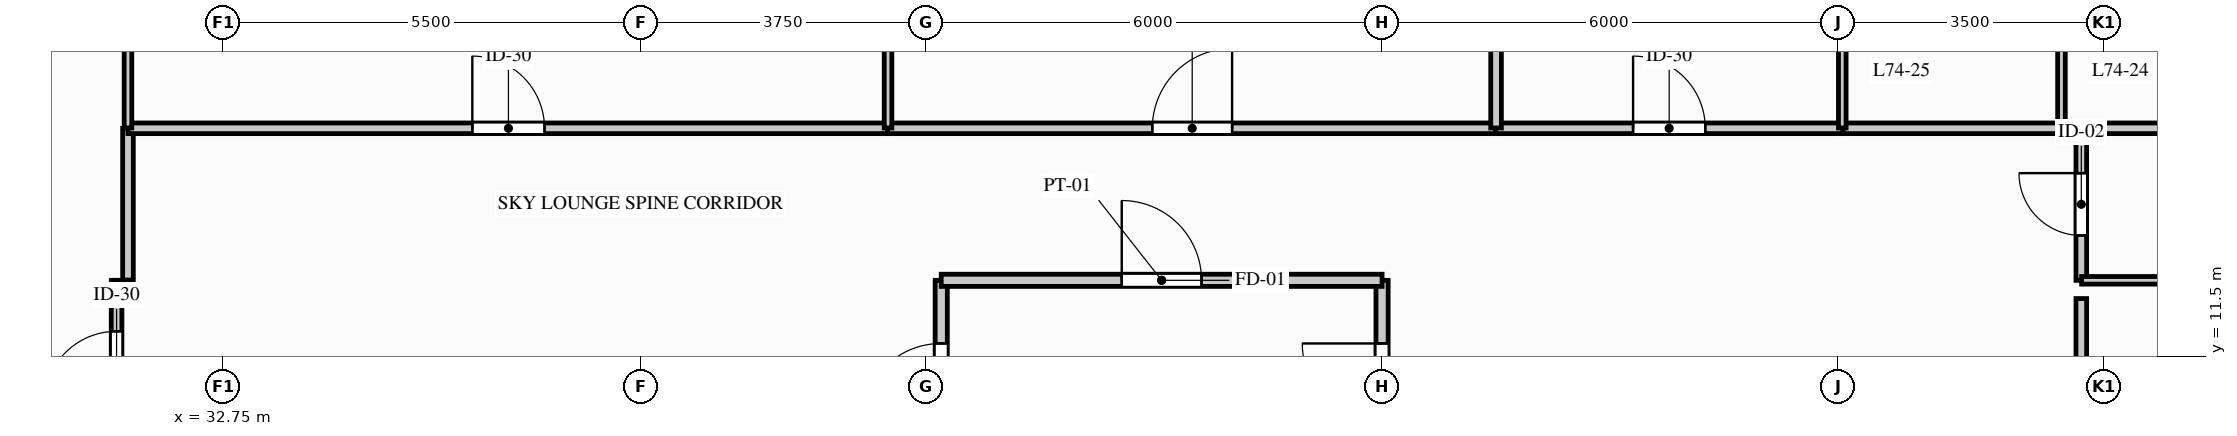
"""IFC4 building model, lengths in metres.
Left out: names, types, materials, properties, quantities, classifications, styles, units other than length and angle.
Written with IfcOpenShell. Run it as: python <this file> out.ifc"""

import sys

from ifc_helpers import new_model, si_unit, direction, frame, frame_2d, origin, place, context, subcontext, project, spatial, rectangle, extrude, element, fill, save


model = new_model("IFC4")
c1 = context("Model", 3, precision=1e-05, world=origin(), true_north=direction((0.0, 1.0)))
c2 = subcontext(c1, "Body", "Model", "MODEL_VIEW")
j1 = project(units=[si_unit("LENGTHUNIT", "METRE"), si_unit("PLANEANGLEUNIT", "RADIAN")], contexts=[c1])
p1 = place(None, origin())
s1 = spatial("IfcSite", under=j1, at=p1, CompositionType="ELEMENT")
p2 = place(p1, origin())
s2 = spatial("IfcBuilding", under=s1, at=p2, CompositionType="ELEMENT")
p3 = place(p2, frame((0.0, 0.0, 243.65)))
s3 = spatial("IfcBuildingStorey", under=s2, at=p3, CompositionType="ELEMENT", Elevation=243.65)
p4 = place(p3, frame((31.35, 10.209, 0.0), z_axis=(0.0, 0.0, 1.0), x_axis=(0.0, 1.0, 0.0)))
e1 = element("IfcWall", 1, at=p4, inside=s3, PredefinedType="PARTITIONING", context=c2, shape_type="SweptSolid", body=[
    extrude(rectangle(XDim=2.291, YDim=0.14, at=frame_2d((1.146, 0.0))), origin(), (0.0, 0.0, 1.0), 3.34),
])
p5 = place(p4, frame((0.671, 0.0, 0.0)))
e2 = element("IfcOpeningElement", 2, at=p5, cuts=e1, PredefinedType="OPENING", context=c2, shape_type="SweptSolid", body=[
    extrude(rectangle(XDim=0.95, YDim=2.05, at=frame_2d((0.475, 1.025))), frame((0.0, 0.08, 0.0), z_axis=(0.0, -1.0, 0.0), x_axis=(1.0, 0.0, 0.0)), (0.0, 0.0, 1.0), 0.16),
])
p6 = place(p3, frame((42.2, 9.789, 0.0), z_axis=(0.0, 0.0, 1.0), x_axis=(0.0, 1.0, 0.0)))
e3 = element("IfcWall", 3, at=p6, inside=s3, PredefinedType="PARTITIONING", context=c2, shape_type="SweptSolid", body=[
    extrude(rectangle(XDim=2.711, YDim=0.16, at=frame_2d((1.355, 0.0))), origin(), (0.0, 0.0, 1.0), 2.279),
])
p7 = place(p6, frame((0.831, 0.0, 0.0)))
e4 = element("IfcOpeningElement", 4, at=p7, cuts=e3, PredefinedType="OPENING", context=c2, shape_type="SweptSolid", body=[
    extrude(rectangle(XDim=1.05, YDim=2.06, at=frame_2d((0.525, 1.03))), frame((0.0, 0.09, 0.0), z_axis=(0.0, -1.0, 0.0), x_axis=(1.0, 0.0, 0.0)), (0.0, 0.0, 1.0), 0.18),
])
p8 = place(p3, frame((48.0, 9.789, 0.0), z_axis=(0.0, 0.0, 1.0), x_axis=(0.0, 1.0, 0.0)))
e5 = element("IfcWall", 5, at=p8, inside=s3, PredefinedType="PARTITIONING", context=c2, shape_type="SweptSolid", body=[
    extrude(rectangle(XDim=2.711, YDim=0.16, at=frame_2d((1.355, 0.0))), origin(), (0.0, 0.0, 1.0), 2.703),
])
p9 = place(p8, frame((0.831, 0.0, 0.0)))
e6 = element("IfcOpeningElement", 6, at=p9, cuts=e5, PredefinedType="OPENING", context=c2, shape_type="SweptSolid", body=[
    extrude(rectangle(XDim=1.05, YDim=2.06, at=frame_2d((0.525, 1.03))), frame((0.0, 0.09, 0.0), z_axis=(0.0, -1.0, 0.0), x_axis=(1.0, 0.0, 0.0)), (0.0, 0.0, 1.0), 0.18),
])
p10 = place(p3, frame((42.2, 12.5, 0.0), z_axis=(0.0, 0.0, 1.0), x_axis=(1.0, 0.0, 0.0)))
e7 = element("IfcWall", 7, at=p10, inside=s3, PredefinedType="PARTITIONING", context=c2, shape_type="SweptSolid", body=[
    extrude(rectangle(XDim=5.8, YDim=0.16, at=frame_2d((2.9, 0.0))), origin(), (0.0, 0.0, 1.0), 2.703),
])
p11 = place(p10, frame((2.375, 0.0, 0.0)))
e8 = element("IfcOpeningElement", 8, at=p11, cuts=e7, PredefinedType="OPENING", context=c2, shape_type="SweptSolid", body=[
    extrude(rectangle(XDim=1.05, YDim=2.06, at=frame_2d((0.525, 1.03))), frame((0.0, 0.09, 0.0), z_axis=(0.0, -1.0, 0.0), x_axis=(1.0, 0.0, 0.0)), (0.0, 0.0, 1.0), 0.18),
])
p12 = place(p3, frame((57.2, 12.5, 0.0), z_axis=(0.0, 0.0, 1.0), x_axis=(0.0, 1.0, 0.0)))
e9 = element("IfcWall", 9, at=p12, inside=s3, PredefinedType="PARTITIONING", context=c2, shape_type="SweptSolid", body=[
    extrude(rectangle(XDim=2.0, YDim=0.14, at=frame_2d((1.0, 0.0))), origin(), (0.0, 0.0, 1.0), 3.34),
])
p13 = place(p12, frame((0.59, 0.0, 0.0)))
e10 = element("IfcOpeningElement", 10, at=p13, cuts=e9, PredefinedType="OPENING", context=c2, shape_type="SweptSolid", body=[
    extrude(rectangle(XDim=0.82, YDim=2.02, at=frame_2d((0.41, 1.01))), frame((0.0, 0.08, 0.0), z_axis=(0.0, -1.0, 0.0), x_axis=(1.0, 0.0, 0.0)), (0.0, 0.0, 1.0), 0.16),
])
p14 = place(p3, frame((31.5, 12.504, 0.0), z_axis=(0.0, 0.0, 1.0), x_axis=(0.0, 1.0, 0.0)))
e11 = element("IfcWall", 11, at=p14, inside=s3, PredefinedType="PARTITIONING", context=c2, shape_type="SweptSolid", body=[
    extrude(rectangle(XDim=1.996, YDim=0.14, at=frame_2d((0.998, 0.0))), origin(), (0.0, 0.0, 1.0), 3.34),
])
p15 = place(p3, frame((31.5, 14.5, 0.0), z_axis=(0.0, 0.0, 1.0), x_axis=(1.0, 0.0, 0.0)))
e12 = element("IfcWall", 12, at=p15, inside=s3, PredefinedType="PARTITIONING", context=c2, shape_type="SweptSolid", body=[
    extrude(rectangle(XDim=10.011, YDim=0.14, at=frame_2d((5.006, 0.0))), origin(), (0.0, 0.0, 1.0), 2.703),
])
p16 = place(p15, frame((4.531, 0.0, 0.0)))
e13 = element("IfcOpeningElement", 13, at=p16, cuts=e12, PredefinedType="OPENING", context=c2, shape_type="SweptSolid", body=[
    extrude(rectangle(XDim=0.95, YDim=2.05, at=frame_2d((0.475, 1.025))), frame((0.0, 0.08, 0.0), z_axis=(0.0, -1.0, 0.0), x_axis=(1.0, 0.0, 0.0)), (0.0, 0.0, 1.0), 0.16),
])
p17 = place(p3, frame((41.493, 14.5, 0.0), z_axis=(0.0, 0.0, 1.0), x_axis=(1.0, 0.0, 0.0)))
e14 = element("IfcWall", 14, at=p17, inside=s3, PredefinedType="PARTITIONING", context=c2, shape_type="SweptSolid", body=[
    extrude(rectangle(XDim=8.019, YDim=0.14, at=frame_2d((4.009, 0.0))), origin(), (0.0, 0.0, 1.0), 2.703),
])
p18 = place(p17, frame((3.484, 0.0, 0.0)))
e15 = element("IfcOpeningElement", 15, at=p18, cuts=e14, PredefinedType="OPENING", context=c2, shape_type="SweptSolid", body=[
    extrude(rectangle(XDim=1.05, YDim=2.06, at=frame_2d((0.525, 1.03))), frame((0.0, 0.08, 0.0), z_axis=(0.0, -1.0, 0.0), x_axis=(1.0, 0.0, 0.0)), (0.0, 0.0, 1.0), 0.16),
])
p19 = place(p3, frame((54.044, 14.5, 0.0), z_axis=(0.0, 0.0, 1.0), x_axis=(1.0, 0.0, 0.0)))
e16 = element("IfcWall", 16, at=p19, inside=s3, PredefinedType="PARTITIONING", context=c2, shape_type="SweptSolid", body=[
    extrude(rectangle(XDim=2.903, YDim=0.14, at=frame_2d((1.451, 0.0))), origin(), (0.0, 0.0, 1.0), 2.703),
])
p20 = place(p3, frame((49.493, 14.5, 0.0), z_axis=(0.0, 0.0, 1.0), x_axis=(1.0, 0.0, 0.0)))
e17 = element("IfcWall", 17, at=p20, inside=s3, PredefinedType="PARTITIONING", context=c2, shape_type="SweptSolid", body=[
    extrude(rectangle(XDim=4.57, YDim=0.14, at=frame_2d((2.285, 0.0))), origin(), (0.0, 0.0, 1.0), 2.703),
])
p21 = place(p20, frame((1.81, 0.0, 0.0)))
e18 = element("IfcOpeningElement", 18, at=p21, cuts=e17, PredefinedType="OPENING", context=c2, shape_type="SweptSolid", body=[
    extrude(rectangle(XDim=0.95, YDim=2.05, at=frame_2d((0.475, 1.025))), frame((0.0, 0.08, 0.0), z_axis=(0.0, -1.0, 0.0), x_axis=(1.0, 0.0, 0.0)), (0.0, 0.0, 1.0), 0.16),
])
p22 = place(p3, frame((57.204, 12.5, 0.0), z_axis=(0.0, 0.0, 1.0), x_axis=(1.0, 0.0, 0.0)))
e19 = element("IfcWall", 19, at=p22, inside=s3, PredefinedType="PARTITIONING", context=c2, shape_type="SweptSolid", body=[
    extrude(rectangle(XDim=2.596, YDim=0.1, at=frame_2d((1.298, 0.0))), origin(), (0.0, 0.0, 1.0), 3.34),
])
p23 = place(p3, frame((57.204, 14.5, 0.0), z_axis=(0.0, 0.0, 1.0), x_axis=(1.0, 0.0, 0.0)))
e20 = element("IfcWall", 20, at=p23, inside=s3, PredefinedType="PARTITIONING", context=c2, shape_type="SweptSolid", body=[
    extrude(rectangle(XDim=2.596, YDim=0.14, at=frame_2d((1.298, 0.0))), origin(), (0.0, 0.0, 1.0), 3.34),
])
p24 = place(p3, frame((31.5, 14.504, 0.0), z_axis=(0.0, 0.0, 1.0), x_axis=(0.0, 1.0, 0.0)))
e21 = element("IfcWall", 21, at=p24, inside=s3, PredefinedType="PARTITIONING", context=c2, shape_type="SweptSolid", body=[
    extrude(rectangle(XDim=8.776, YDim=0.1, at=frame_2d((4.388, 0.0))), origin(), (0.0, 0.0, 1.0), 2.279),
])
p25 = place(p3, frame((41.5, 14.504, 0.0), z_axis=(0.0, 0.0, 1.0), x_axis=(0.0, 1.0, 0.0)))
e22 = element("IfcWall", 22, at=p25, inside=s3, PredefinedType="PARTITIONING", context=c2, shape_type="SweptSolid", body=[
    extrude(rectangle(XDim=11.796, YDim=0.1, at=frame_2d((5.898, 0.0))), origin(), (0.0, 0.0, 1.0), 2.279),
])
p26 = place(p3, frame((49.5, 14.504, 0.0), z_axis=(0.0, 0.0, 1.0), x_axis=(0.0, 1.0, 0.0)))
e23 = element("IfcWall", 23, at=p26, inside=s3, PredefinedType="PARTITIONING", context=c2, shape_type="SweptSolid", body=[
    extrude(rectangle(XDim=7.203, YDim=0.14, at=frame_2d((3.602, 0.0))), origin(), (0.0, 0.0, 1.0), 2.703),
])
for number, where, z_axis, x_axis in (
    (24, (56.939, 14.504, 0.0), (0.0, 0.0, 1.0), (0.0, 1.0, 0.0)),
    (25, (54.055, 14.504, 0.0), (0.0, 0.0, 1.0), (0.0, 1.0, 0.0)),
):
    element("IfcWall", number, at=place(p3, frame(where, z_axis=z_axis, x_axis=x_axis)), inside=s3, PredefinedType="PARTITIONING", context=c2, shape_type="SweptSolid", body=[
        extrude(rectangle(XDim=2.346, YDim=0.1, at=frame_2d((1.173, 0.0))), origin(), (0.0, 0.0, 1.0), 2.703),
    ])
p27 = place(p3, frame((57.2, 10.04, 0.0), z_axis=(0.0, 0.0, 1.0), x_axis=(0.0, 1.0, 0.0)))
e26 = element("IfcWall", 26, at=p27, inside=s3, PredefinedType="PARTITIONING", context=c2, shape_type="SweptSolid", body=[
    extrude(rectangle(XDim=2.22, YDim=0.14, at=frame_2d((1.11, 0.0))), origin(), (0.0, 0.0, 1.0), 2.703),
])
p28 = place(p5, origin())
e27 = element("IfcDoor", 27, at=p28, inside=s3, OperationType="SINGLE_SWING_LEFT", PredefinedType="DOOR", context=c2, shape_type="SweptSolid", body=[
    extrude(rectangle(XDim=0.95, YDim=2.05, at=frame_2d((0.475, 1.025))), frame((0.0, 0.025, 0.0), z_axis=(0.0, -1.0, 0.0), x_axis=(1.0, 0.0, 0.0)), (0.0, 0.0, 1.0), 0.05),
])
fill(e2, e27)
p29 = place(p7, origin())
e28 = element("IfcDoor", 28, at=p29, inside=s3, OperationType="SINGLE_SWING_LEFT", PredefinedType="DOOR", context=c2, shape_type="SweptSolid", body=[
    extrude(rectangle(XDim=1.05, YDim=2.06, at=frame_2d((0.525, 1.03))), frame((0.0, 0.025, 0.0), z_axis=(0.0, -1.0, 0.0), x_axis=(1.0, 0.0, 0.0)), (0.0, 0.0, 1.0), 0.05),
])
fill(e4, e28)
p30 = place(p9, origin())
e29 = element("IfcDoor", 29, at=p30, inside=s3, OperationType="SINGLE_SWING_RIGHT", PredefinedType="DOOR", context=c2, shape_type="SweptSolid", body=[
    extrude(rectangle(XDim=1.05, YDim=2.06, at=frame_2d((0.525, 1.03))), frame((0.0, 0.025, 0.0), z_axis=(0.0, -1.0, 0.0), x_axis=(1.0, 0.0, 0.0)), (0.0, 0.0, 1.0), 0.05),
])
fill(e6, e29)
p31 = place(p11, origin())
e30 = element("IfcDoor", 30, at=p31, inside=s3, OperationType="SINGLE_SWING_LEFT", PredefinedType="DOOR", context=c2, shape_type="SweptSolid", body=[
    extrude(rectangle(XDim=1.05, YDim=2.06, at=frame_2d((0.525, 1.03))), frame((0.0, 0.025, 0.0), z_axis=(0.0, -1.0, 0.0), x_axis=(1.0, 0.0, 0.0)), (0.0, 0.0, 1.0), 0.05),
])
fill(e8, e30)
p32 = place(p13, origin())
e31 = element("IfcDoor", 31, at=p32, inside=s3, OperationType="SINGLE_SWING_RIGHT", PredefinedType="DOOR", context=c2, shape_type="SweptSolid", body=[
    extrude(rectangle(XDim=0.82, YDim=2.02, at=frame_2d((0.41, 1.01))), frame((0.0, 0.025, 0.0), z_axis=(0.0, -1.0, 0.0), x_axis=(1.0, 0.0, 0.0)), (0.0, 0.0, 1.0), 0.05),
])
fill(e10, e31)
p33 = place(p16, origin())
e32 = element("IfcDoor", 32, at=p33, inside=s3, OperationType="SINGLE_SWING_LEFT", PredefinedType="DOOR", context=c2, shape_type="SweptSolid", body=[
    extrude(rectangle(XDim=0.95, YDim=2.05, at=frame_2d((0.475, 1.025))), frame((0.0, 0.025, 0.0), z_axis=(0.0, -1.0, 0.0), x_axis=(1.0, 0.0, 0.0)), (0.0, 0.0, 1.0), 0.05),
])
fill(e13, e32)
p34 = place(p18, origin())
e33 = element("IfcDoor", 33, at=p34, inside=s3, OperationType="SINGLE_SWING_RIGHT", PredefinedType="DOOR", context=c2, shape_type="SweptSolid", body=[
    extrude(rectangle(XDim=1.05, YDim=2.06, at=frame_2d((0.525, 1.03))), frame((0.0, 0.025, 0.0), z_axis=(0.0, -1.0, 0.0), x_axis=(1.0, 0.0, 0.0)), (0.0, 0.0, 1.0), 0.05),
])
fill(e15, e33)
p35 = place(p21, origin())
e34 = element("IfcDoor", 34, at=p35, inside=s3, OperationType="SINGLE_SWING_LEFT", PredefinedType="DOOR", context=c2, shape_type="SweptSolid", body=[
    extrude(rectangle(XDim=0.95, YDim=2.05, at=frame_2d((0.475, 1.025))), frame((0.0, 0.025, 0.0), z_axis=(0.0, -1.0, 0.0), x_axis=(1.0, 0.0, 0.0)), (0.0, 0.0, 1.0), 0.05),
])
fill(e18, e34)
save(model, sys.argv[1])
